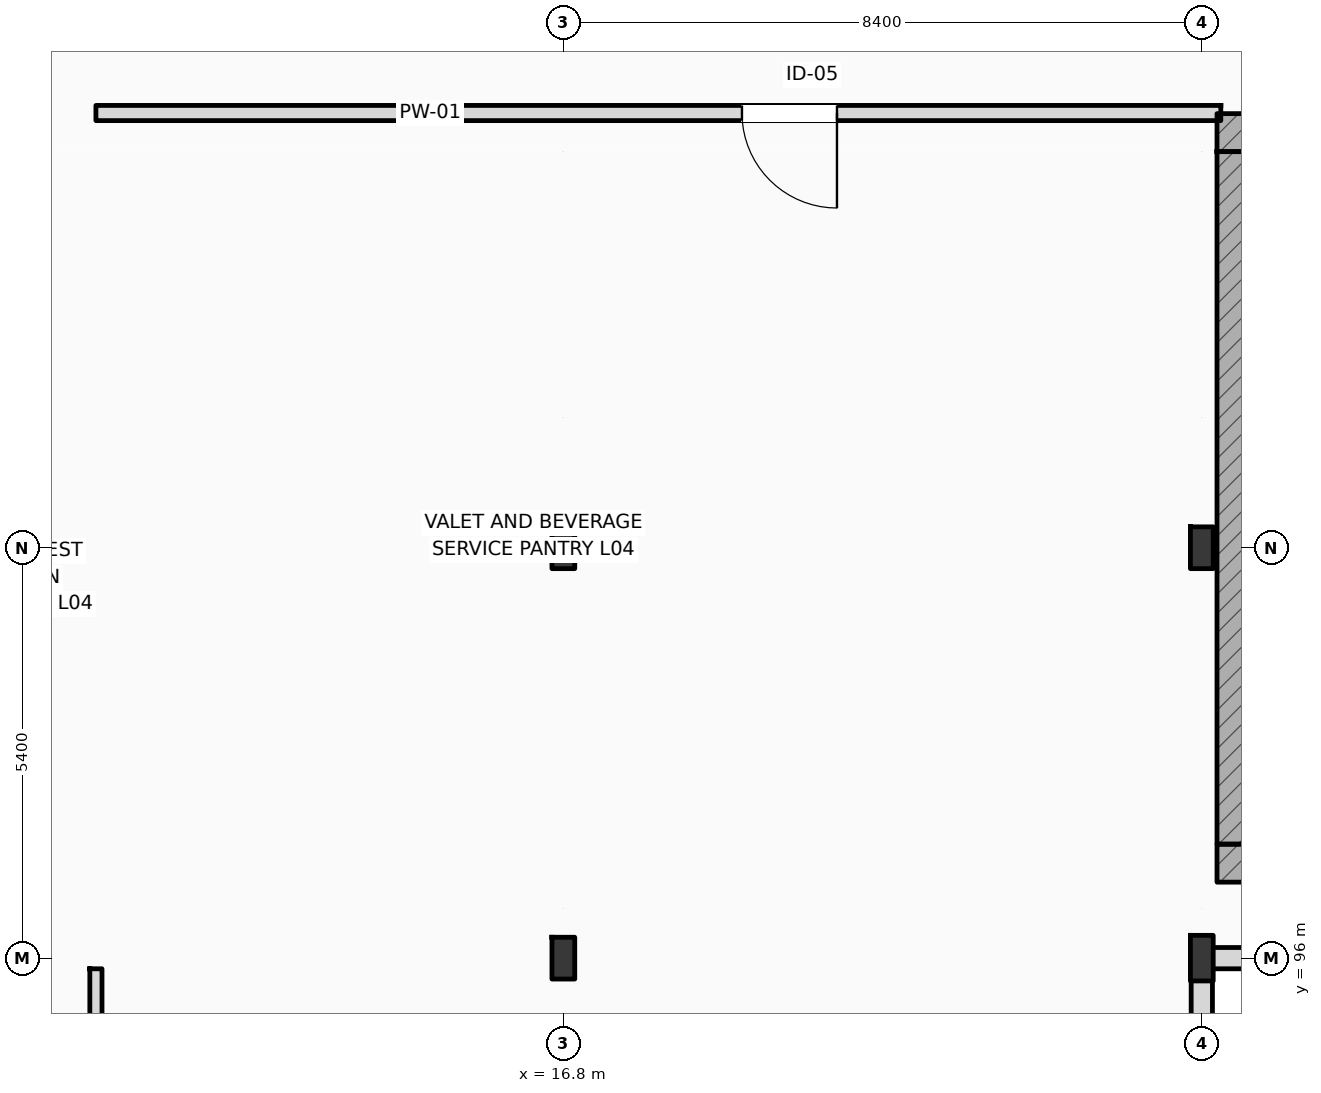
"""IFC4 building model, lengths in metres.
Left out: names, types, materials, properties, quantities, classifications, styles, units other than length and angle.
Written with IfcOpenShell. Run it as: python <this file> out.ifc"""

import sys

from ifc_helpers import new_model, si_unit, direction, frame, frame_2d, origin, origin_2d, place, context, subcontext, project, spatial, rectangle, i_section, extrude, element, fill, save


model = new_model("IFC4")
c1 = context("Model", 3, precision=1e-05, world=origin(), true_north=direction((0.0, 1.0)))
c2 = subcontext(c1, "Body", "Model", "MODEL_VIEW")
j1 = project(units=[si_unit("LENGTHUNIT", "METRE"), si_unit("PLANEANGLEUNIT", "RADIAN")], contexts=[c1])
p1 = place(None, origin())
s1 = spatial("IfcSite", under=j1, at=p1, CompositionType="ELEMENT")
p2 = place(p1, origin())
s2 = spatial("IfcBuilding", under=s1, at=p2, CompositionType="ELEMENT")
p3 = place(p2, frame((0.0, 0.0, 20.4)))
s3 = spatial("IfcBuildingStorey", under=s2, at=p3, CompositionType="ELEMENT", Elevation=20.4)
p4 = place(p3, frame((16.8, 96.0, 0.0), z_axis=(0.0, 0.0, 1.0), x_axis=(1.0, 0.0, 0.0)))
e1 = element("IfcColumn", 1, at=p4, inside=s3, PredefinedType="COLUMN", context=c2, shape_type="SweptSolid", body=[
    extrude(i_section(OverallWidth=0.3, OverallDepth=0.55, WebThickness=0.015, FlangeThickness=0.029, FilletRadius=0.027, at=origin_2d()), origin(), (0.0, 0.0, 1.0), 4.2),
])
p5 = place(p3, frame((25.2, 96.0, 0.0), z_axis=(0.0, 0.0, 1.0), x_axis=(1.0, 0.0, 0.0)))
e2 = element("IfcColumn", 2, at=p5, inside=s3, PredefinedType="COLUMN", context=c2, shape_type="SweptSolid", body=[
    extrude(i_section(OverallWidth=0.3, OverallDepth=0.6, WebThickness=0.015, FlangeThickness=0.03, FilletRadius=0.027, at=origin_2d()), origin(), (0.0, 0.0, 1.0), 4.2),
])
for number, where, z_axis, x_axis in (
    (3, (16.8, 101.4, 0.0), (0.0, 0.0, 1.0), (1.0, 0.0, 0.0)),
    (4, (25.2, 101.4, 0.0), (0.0, 0.0, 1.0), (1.0, 0.0, 0.0)),
):
    element("IfcColumn", number, at=place(p3, frame(where, z_axis=z_axis, x_axis=x_axis)), inside=s3, PredefinedType="COLUMN", context=c2, shape_type="SweptSolid", body=[
        extrude(i_section(OverallWidth=0.3, OverallDepth=0.55, WebThickness=0.015, FlangeThickness=0.029, FilletRadius=0.027, at=origin_2d()), origin(), (0.0, 0.0, 1.0), 4.2),
    ])
for number, where, z_axis, x_axis in (
    (5, (25.4, 106.862, 0.0), (0.0, 0.0, 1.0), (1.0, 0.0, 0.0)),
    (6, (25.4, 97.25, 0.0), (0.0, 0.0, 1.0), (1.0, 0.0, 0.0)),
):
    element("IfcWall", number, at=place(p3, frame(where, z_axis=z_axis, x_axis=x_axis)), inside=s3, PredefinedType="SHEAR", context=c2, shape_type="SweptSolid", body=[
        extrude(rectangle(XDim=5.16, YDim=0.5, at=frame_2d((2.58, 0.0))), origin(), (0.0, 0.0, 1.0), 4.2),
    ])
p6 = place(p3, frame((25.65, 97.5, 0.0), z_axis=(0.0, 0.0, 1.0), x_axis=(0.0, 1.0, 0.0)))
e7 = element("IfcWall", 7, at=p6, inside=s3, PredefinedType="SHEAR", context=c2, shape_type="SweptSolid", body=[
    extrude(rectangle(XDim=9.112, YDim=0.5, at=frame_2d((4.556, 0.0))), origin(), (0.0, 0.0, 1.0), 4.2),
])
p7 = place(p3, frame((25.2, 96.0, 0.0), z_axis=(0.0, 0.0, 1.0), x_axis=(1.0, 0.0, 0.0)))
e8 = element("IfcWall", 8, at=p7, inside=s3, PredefinedType="STANDARD", context=c2, shape_type="SweptSolid", body=[
    extrude(rectangle(XDim=23.4, YDim=0.28, at=frame_2d((11.7, 0.0))), origin(), (0.0, 0.0, 1.0), 3.48),
])
p8 = place(p3, frame((25.2, 79.5, 0.0), z_axis=(0.0, 0.0, 1.0), x_axis=(0.0, 1.0, 0.0)))
e9 = element("IfcWall", 9, at=p8, inside=s3, PredefinedType="STANDARD", context=c2, shape_type="SweptSolid", body=[
    extrude(rectangle(XDim=16.5, YDim=0.28, at=frame_2d((8.25, 0.0))), origin(), (0.0, 0.0, 1.0), 3.53),
])
p9 = place(p3, frame((10.65, 107.12, 0.0), z_axis=(0.0, 0.0, 1.0), x_axis=(1.0, 0.0, 0.0)))
e10 = element("IfcWall", 10, at=p9, inside=s3, PredefinedType="PARTITIONING", context=c2, shape_type="SweptSolid", body=[
    extrude(rectangle(XDim=14.8, YDim=0.2, at=frame_2d((7.4, 0.0))), origin(), (0.0, 0.0, 1.0), 3.94),
])
p10 = place(p9, frame((8.5, 0.0, 0.0)))
e11 = element("IfcOpeningElement", 11, at=p10, cuts=e10, PredefinedType="OPENING", context=c2, shape_type="SweptSolid", body=[
    extrude(rectangle(XDim=1.25, YDim=2.15, at=frame_2d((0.625, 1.075))), frame((0.0, 0.11, 0.0), z_axis=(0.0, -1.0, 0.0), x_axis=(1.0, 0.0, 0.0)), (0.0, 0.0, 1.0), 0.22),
])
p11 = place(p3, frame((10.65, 91.28, 0.0), z_axis=(0.0, 0.0, 1.0), x_axis=(0.0, 1.0, 0.0)))
e12 = element("IfcWall", 12, at=p11, inside=s3, PredefinedType="PARTITIONING", context=c2, shape_type="SweptSolid", body=[
    extrude(rectangle(XDim=4.58, YDim=0.16, at=frame_2d((2.29, 0.0))), origin(), (0.0, 0.0, 1.0), 3.94),
])
p12 = place(p11, frame((2.0, 0.0, 0.0)))
e13 = element("IfcOpeningElement", 13, at=p12, cuts=e12, PredefinedType="OPENING", context=c2, shape_type="SweptSolid", body=[
    extrude(rectangle(XDim=0.9, YDim=2.1, at=frame_2d((0.45, 1.05))), frame((0.0, 0.09, 0.0), z_axis=(0.0, -1.0, 0.0), x_axis=(1.0, 0.0, 0.0)), (0.0, 0.0, 1.0), 0.18),
])
p13 = place(p10, frame((1.25, 0.0, 0.0), z_axis=(0.0, 0.0, 1.0), x_axis=(-1.0, 0.0, 0.0)))
e14 = element("IfcDoor", 14, at=p13, inside=s3, OperationType="SINGLE_SWING_RIGHT", PredefinedType="DOOR", context=c2, shape_type="SweptSolid", body=[
    extrude(rectangle(XDim=1.25, YDim=2.15, at=frame_2d((0.625, 1.075))), frame((0.0, 0.025, 0.0), z_axis=(0.0, -1.0, 0.0), x_axis=(1.0, 0.0, 0.0)), (0.0, 0.0, 1.0), 0.05),
])
fill(e11, e14)
save(model, sys.argv[1])
